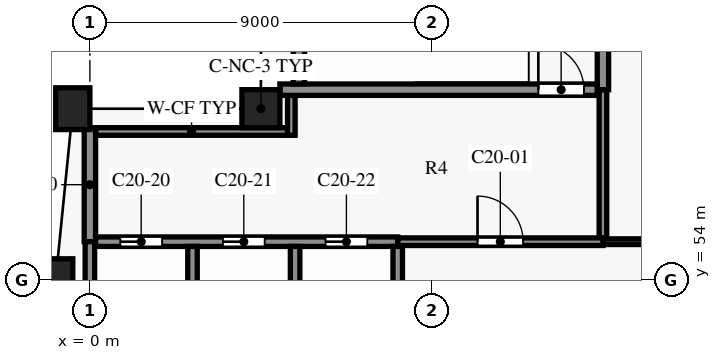
"""IFC4 building model, lengths in metres.
Left out: names, types, materials, properties, quantities, classifications, styles, units other than length and angle.
Written with IfcOpenShell. Run it as: python <this file> out.ifc"""

import sys

from ifc_helpers import new_model, si_unit, direction, frame, frame_2d, origin, origin_2d, place, context, subcontext, project, spatial, rectangle, extrude, element, fill, save


model = new_model("IFC4")
c1 = context("Model", 3, precision=1e-05, world=origin(), true_north=direction((0.0, 1.0)))
c2 = subcontext(c1, "Body", "Model", "MODEL_VIEW")
j1 = project(units=[si_unit("LENGTHUNIT", "METRE"), si_unit("PLANEANGLEUNIT", "RADIAN")], contexts=[c1])
p1 = place(None, origin())
s1 = spatial("IfcSite", under=j1, at=p1, CompositionType="ELEMENT")
p2 = place(p1, origin())
s2 = spatial("IfcBuilding", under=s1, at=p2, CompositionType="ELEMENT")
p3 = place(p2, frame((0.0, 0.0, 143.4)))
s3 = spatial("IfcBuildingStorey", under=s2, at=p3, CompositionType="ELEMENT", Elevation=143.4)
for number, where, z_axis, x_axis in (
    (1, (-0.45, 58.5, 0.0), (0.0, 0.0, 1.0), (-0.1, -0.995, 0.0)),
    (2, (-0.9, 54.0, 0.0), (0.0, 0.0, 1.0), (0.0, -1.0, 0.0)),
):
    element("IfcColumn", number, at=place(p3, frame(where, z_axis=z_axis, x_axis=x_axis)), inside=s3, PredefinedType="COLUMN", context=c2, shape_type="SweptSolid", body=[
        extrude(rectangle(XDim=0.9, YDim=1.1, at=origin_2d()), origin(), (0.0, 0.0, 1.0), 3.8),
    ])
p4 = place(p3, frame((4.5, 58.5, 0.0), z_axis=(0.0, 0.0, 1.0), x_axis=(1.0, 0.0, 0.0)))
e3 = element("IfcColumn", 3, at=p4, inside=s3, PredefinedType="COLUMN", context=c2, shape_type="SweptSolid", body=[
    extrude(rectangle(XDim=1.0, YDim=1.0, at=origin_2d()), origin(), (0.0, 0.0, 1.0), 3.8),
])
p5 = place(p3, frame((8.1, 55.0, 0.0), z_axis=(0.0, 0.0, 1.0), x_axis=(1.0, 0.0, 0.0)))
e4 = element("IfcWall", 4, at=p5, inside=s3, PredefinedType="PARTITIONING", context=c2, shape_type="SweptSolid", body=[
    extrude(rectangle(XDim=5.4, YDim=0.2, at=frame_2d((2.7, 0.0))), origin(), (0.0, 0.0, 1.0), 3.5),
])
p6 = place(p5, frame((2.1, 0.0, 0.0)))
e5 = element("IfcOpeningElement", 5, at=p6, cuts=e4, PredefinedType="OPENING", context=c2, shape_type="SweptSolid", body=[
    extrude(rectangle(XDim=1.2, YDim=2.2, at=frame_2d((0.6, 1.1))), frame((0.0, 0.11, 0.0), z_axis=(0.0, -1.0, 0.0), x_axis=(1.0, 0.0, 0.0)), (0.0, 0.0, 1.0), 0.22),
])
p7 = place(p3, frame((13.5, 55.0, 0.0), z_axis=(0.0, 0.0, 1.0), x_axis=(1.0, 0.0, 0.0)))
e6 = element("IfcWall", 6, at=p7, inside=s3, PredefinedType="PARTITIONING", context=c2, shape_type="SweptSolid", body=[
    extrude(rectangle(XDim=9.9, YDim=0.15, at=frame_2d((4.95, 0.0))), origin(), (0.0, 0.0, 1.0), 3.5),
])
p8 = place(p7, frame((2.45, 0.0, 0.0)))
e7 = element("IfcOpeningElement", 7, at=p8, cuts=e6, PredefinedType="OPENING", context=c2, shape_type="SweptSolid", body=[
    extrude(rectangle(XDim=1.0, YDim=2.1, at=frame_2d((0.5, 1.05))), frame((0.0, 0.085, 0.0), z_axis=(0.0, -1.0, 0.0), x_axis=(1.0, 0.0, 0.0)), (0.0, 0.0, 1.0), 0.17),
])
p9 = place(p7, frame((7.4, 0.0, 0.0)))
e8 = element("IfcOpeningElement", 8, at=p9, cuts=e6, PredefinedType="OPENING", context=c2, shape_type="SweptSolid", body=[
    extrude(rectangle(XDim=1.0, YDim=2.1, at=frame_2d((0.5, 1.05))), frame((0.0, 0.085, 0.0), z_axis=(0.0, -1.0, 0.0), x_axis=(1.0, 0.0, 0.0)), (0.0, 0.0, 1.0), 0.17),
])
p10 = place(p3, frame((0.15, 55.0, 0.0), z_axis=(0.0, 0.0, 1.0), x_axis=(1.0, 0.0, 0.0)))
e9 = element("IfcWall", 9, at=p10, inside=s3, PredefinedType="SHEAR", context=c2, shape_type="SweptSolid", body=[
    extrude(rectangle(XDim=7.95, YDim=0.25, at=frame_2d((3.975, 0.0))), origin(), (0.0, 0.0, 1.0), 3.5),
])
p11 = place(p10, frame((0.65, 0.0, 0.0)))
e10 = element("IfcOpeningElement", 10, at=p11, cuts=e9, PredefinedType="OPENING", context=c2, shape_type="SweptSolid", body=[
    extrude(rectangle(XDim=1.1, YDim=2.1, at=frame_2d((0.55, 1.05))), frame((0.0, 0.135, 0.0), z_axis=(0.0, -1.0, 0.0), x_axis=(1.0, 0.0, 0.0)), (0.0, 0.0, 1.0), 0.27),
])
p12 = place(p10, frame((3.35, 0.0, 0.0)))
e11 = element("IfcOpeningElement", 11, at=p12, cuts=e9, PredefinedType="OPENING", context=c2, shape_type="SweptSolid", body=[
    extrude(rectangle(XDim=1.1, YDim=2.1, at=frame_2d((0.55, 1.05))), frame((0.0, 0.135, 0.0), z_axis=(0.0, -1.0, 0.0), x_axis=(1.0, 0.0, 0.0)), (0.0, 0.0, 1.0), 0.27),
])
p13 = place(p10, frame((6.05, 0.0, 0.0)))
e12 = element("IfcOpeningElement", 12, at=p13, cuts=e9, PredefinedType="OPENING", context=c2, shape_type="SweptSolid", body=[
    extrude(rectangle(XDim=1.1, YDim=2.1, at=frame_2d((0.55, 1.05))), frame((0.0, 0.135, 0.0), z_axis=(0.0, -1.0, 0.0), x_axis=(1.0, 0.0, 0.0)), (0.0, 0.0, 1.0), 0.27),
])
p14 = place(p3, frame((0.15, 57.9, 0.0), z_axis=(0.0, 0.0, 1.0), x_axis=(1.0, 0.0, 0.0)))
e13 = element("IfcWall", 13, at=p14, inside=s3, PredefinedType="PARTITIONING", context=c2, shape_type="SweptSolid", body=[
    extrude(rectangle(XDim=5.05, YDim=0.2, at=frame_2d((2.525, 0.0))), origin(), (0.0, 0.0, 1.0), 3.5),
])
p15 = place(p3, frame((5.0, 59.0, 0.0), z_axis=(0.0, 0.0, 1.0), x_axis=(1.0, 0.0, 0.0)))
e14 = element("IfcWall", 14, at=p15, inside=s3, PredefinedType="SHEAR", context=c2, shape_type="SweptSolid", body=[
    extrude(rectangle(XDim=8.35, YDim=0.3, at=frame_2d((4.175, 0.0))), origin(), (0.0, 0.0, 1.0), 3.5),
])
p16 = place(p15, frame((6.8, 0.0, 0.0)))
e15 = element("IfcOpeningElement", 15, at=p16, cuts=e14, PredefinedType="OPENING", context=c2, shape_type="SweptSolid", body=[
    extrude(rectangle(XDim=1.2, YDim=2.2, at=frame_2d((0.6, 1.1))), frame((0.0, 0.16, 0.0), z_axis=(0.0, -1.0, 0.0), x_axis=(1.0, 0.0, 0.0)), (0.0, 0.0, 1.0), 0.32),
])
p17 = place(p3, frame((0.0, 55.0, 0.0), z_axis=(0.0, 0.0, 1.0), x_axis=(0.0, 1.0, 0.0)))
e16 = element("IfcWall", 16, at=p17, inside=s3, PredefinedType="SHEAR", context=c2, shape_type="SweptSolid", body=[
    extrude(rectangle(XDim=3.0, YDim=0.3, at=frame_2d((1.5, 0.0))), origin(), (0.0, 0.0, 1.0), 3.5),
])
p18 = place(p3, frame((0.0, 51.65, 0.0), z_axis=(0.0, 0.0, 1.0), x_axis=(0.0, 1.0, 0.0)))
e17 = element("IfcWall", 17, at=p18, inside=s3, PredefinedType="SHEAR", context=c2, shape_type="SweptSolid", body=[
    extrude(rectangle(XDim=3.35, YDim=0.25, at=frame_2d((1.675, 0.0))), origin(), (0.0, 0.0, 1.0), 3.5),
])
p19 = place(p3, frame((2.7, 51.925, 0.0), z_axis=(0.0, 0.0, 1.0), x_axis=(0.0, 1.0, 0.0)))
e18 = element("IfcWall", 18, at=p19, inside=s3, PredefinedType="SHEAR", context=c2, shape_type="SweptSolid", body=[
    extrude(rectangle(XDim=2.95, YDim=0.25, at=frame_2d((1.475, 0.0))), origin(), (0.0, 0.0, 1.0), 3.5),
])
p20 = place(p3, frame((5.3, 57.8, 0.0), z_axis=(0.0, 0.0, 1.0), x_axis=(0.0, 1.0, 0.0)))
e19 = element("IfcWall", 19, at=p20, inside=s3, PredefinedType="PARTITIONING", context=c2, shape_type="SweptSolid", body=[
    extrude(rectangle(XDim=1.05, YDim=0.2, at=frame_2d((0.525, 0.0))), origin(), (0.0, 0.0, 1.0), 3.5),
])
p21 = place(p3, frame((5.4, 51.925, 0.0), z_axis=(0.0, 0.0, 1.0), x_axis=(0.0, 1.0, 0.0)))
e20 = element("IfcWall", 20, at=p21, inside=s3, PredefinedType="SHEAR", context=c2, shape_type="SweptSolid", body=[
    extrude(rectangle(XDim=2.95, YDim=0.25, at=frame_2d((1.475, 0.0))), origin(), (0.0, 0.0, 1.0), 3.5),
])
p22 = place(p3, frame((5.5, 59.15, 0.0), z_axis=(0.0, 0.0, 1.0), x_axis=(0.0, 1.0, 0.0)))
e21 = element("IfcWall", 21, at=p22, inside=s3, PredefinedType="SHEAR", context=c2, shape_type="SweptSolid", body=[
    extrude(rectangle(XDim=3.6, YDim=0.3, at=frame_2d((1.8, 0.0))), origin(), (0.0, 0.0, 1.0), 3.5),
])
p23 = place(p3, frame((8.1, 51.925, 0.0), z_axis=(0.0, 0.0, 1.0), x_axis=(0.0, 1.0, 0.0)))
e22 = element("IfcWall", 22, at=p23, inside=s3, PredefinedType="SHEAR", context=c2, shape_type="SweptSolid", body=[
    extrude(rectangle(XDim=2.95, YDim=0.25, at=frame_2d((1.475, 0.0))), origin(), (0.0, 0.0, 1.0), 3.5),
])
p24 = place(p3, frame((13.5, 55.1, 0.0), z_axis=(0.0, 0.0, 1.0), x_axis=(0.0, 1.0, 0.0)))
e23 = element("IfcWall", 23, at=p24, inside=s3, PredefinedType="PARTITIONING", context=c2, shape_type="SweptSolid", body=[
    extrude(rectangle(XDim=3.9, YDim=0.2, at=frame_2d((1.95, 0.0))), origin(), (0.0, 0.0, 1.0), 3.5),
])
p25 = place(p3, frame((13.5, 59.0, 0.0), z_axis=(0.0, 0.0, 1.0), x_axis=(0.0, 1.0, 0.0)))
e24 = element("IfcWall", 24, at=p25, inside=s3, PredefinedType="SHEAR", context=c2, shape_type="SweptSolid", body=[
    extrude(rectangle(XDim=3.897, YDim=0.3, at=frame_2d((1.949, 0.0))), origin(), (0.0, 0.0, 1.0), 3.5),
])
p26 = place(p6, origin())
e25 = element("IfcDoor", 25, at=p26, inside=s3, OperationType="SINGLE_SWING_RIGHT", PredefinedType="DOOR", context=c2, shape_type="SweptSolid", body=[
    extrude(rectangle(XDim=1.2, YDim=2.2, at=frame_2d((0.6, 1.1))), frame((0.0, 0.025, 0.0), z_axis=(0.0, -1.0, 0.0), x_axis=(1.0, 0.0, 0.0)), (0.0, 0.0, 1.0), 0.05),
])
fill(e5, e25)
p27 = place(p16, origin())
e26 = element("IfcDoor", 26, at=p27, inside=s3, OperationType="SINGLE_SWING_RIGHT", PredefinedType="DOOR", context=c2, shape_type="SweptSolid", body=[
    extrude(rectangle(XDim=1.2, YDim=2.2, at=frame_2d((0.6, 1.1))), frame((0.0, 0.025, 0.0), z_axis=(0.0, -1.0, 0.0), x_axis=(1.0, 0.0, 0.0)), (0.0, 0.0, 1.0), 0.05),
])
fill(e15, e26)
p28 = place(p11, origin())
e27 = element("IfcDoor", 27, at=p28, inside=s3, OperationType="DOUBLE_DOOR_SLIDING", PredefinedType="DOOR", context=c2, shape_type="SweptSolid", body=[
    extrude(rectangle(XDim=1.1, YDim=2.1, at=frame_2d((0.55, 1.05))), frame((0.0, 0.025, 0.0), z_axis=(0.0, -1.0, 0.0), x_axis=(1.0, 0.0, 0.0)), (0.0, 0.0, 1.0), 0.05),
])
fill(e10, e27)
p29 = place(p12, origin())
e28 = element("IfcDoor", 28, at=p29, inside=s3, OperationType="DOUBLE_DOOR_SLIDING", PredefinedType="DOOR", context=c2, shape_type="SweptSolid", body=[
    extrude(rectangle(XDim=1.1, YDim=2.1, at=frame_2d((0.55, 1.05))), frame((0.0, 0.025, 0.0), z_axis=(0.0, -1.0, 0.0), x_axis=(1.0, 0.0, 0.0)), (0.0, 0.0, 1.0), 0.05),
])
fill(e11, e28)
p30 = place(p13, origin())
e29 = element("IfcDoor", 29, at=p30, inside=s3, OperationType="DOUBLE_DOOR_SLIDING", PredefinedType="DOOR", context=c2, shape_type="SweptSolid", body=[
    extrude(rectangle(XDim=1.1, YDim=2.1, at=frame_2d((0.55, 1.05))), frame((0.0, 0.025, 0.0), z_axis=(0.0, -1.0, 0.0), x_axis=(1.0, 0.0, 0.0)), (0.0, 0.0, 1.0), 0.05),
])
fill(e12, e29)
save(model, sys.argv[1])
